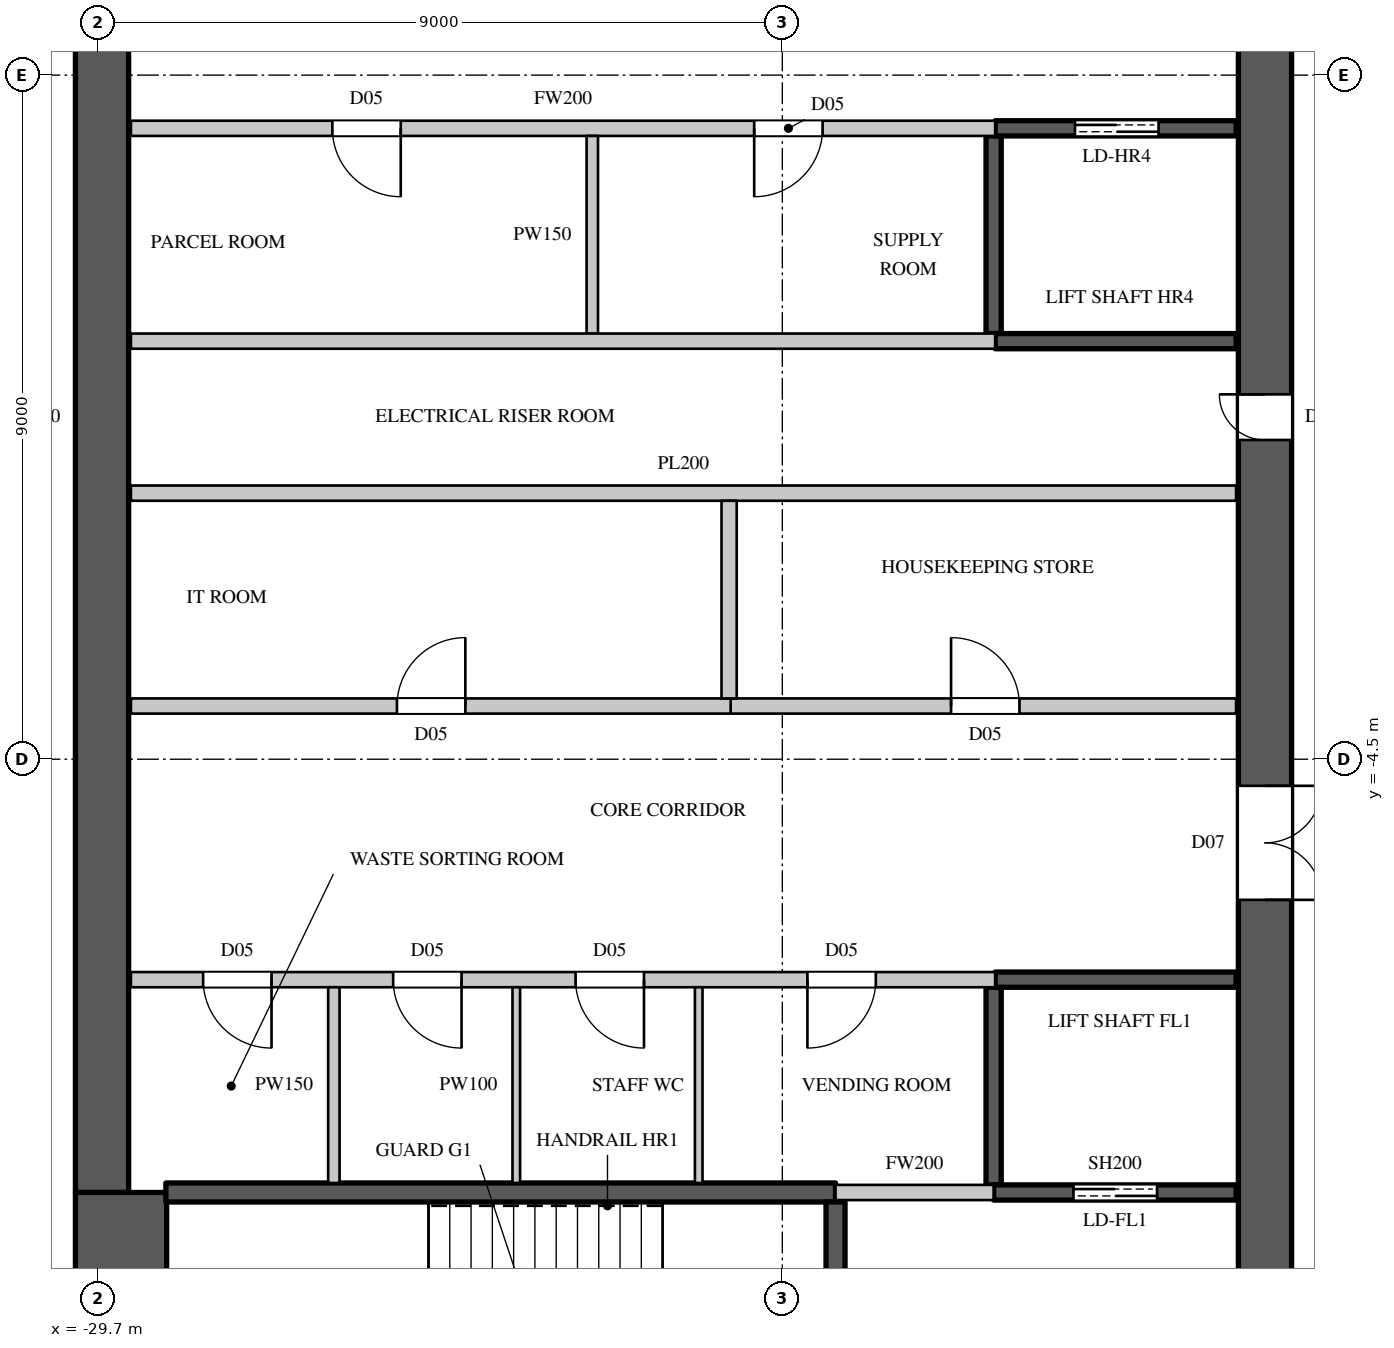
"""IFC4 building model, lengths in metres.
Left out: names, types, materials, properties, quantities, classifications, styles, units other than length and angle.
Written with IfcOpenShell. Run it as: python <this file> out.ifc"""

import sys

from ifc_helpers import new_model, si_unit, direction, frame, frame_2d, origin, place, context, subcontext, project, spatial, rectangle, extrude, element, fill, save


model = new_model("IFC4")
c1 = context("Model", 3, precision=1e-05, world=origin(), true_north=direction((0.0, 1.0)))
c2 = subcontext(c1, "Body", "Model", "MODEL_VIEW")
j1 = project(units=[si_unit("LENGTHUNIT", "METRE"), si_unit("PLANEANGLEUNIT", "RADIAN")], contexts=[c1])
p1 = place(None, origin())
s1 = spatial("IfcSite", under=j1, at=p1, CompositionType="ELEMENT")
p2 = place(p1, origin())
s2 = spatial("IfcBuilding", under=s1, at=p2, CompositionType="ELEMENT")
p3 = place(p2, frame((0.0, 0.0, 251.6)))
s3 = spatial("IfcBuildingStorey", under=s2, at=p3, CompositionType="ELEMENT", Elevation=251.6)
p4 = place(p3, frame((-14.35, -14.8, 0.0), z_axis=(0.0, 0.0, 1.0), x_axis=(0.0, 1.0, 0.0)))
e1 = element("IfcWall", 1, at=p4, inside=s3, PredefinedType="SHEAR", context=c2, shape_type="SweptSolid", body=[
    extrude(rectangle(XDim=29.6, YDim=0.7, at=frame_2d((14.8, 0.0))), origin(), (0.0, 0.0, 1.0), 4.1),
])
p5 = place(p4, frame((1.55, 0.0, 0.0)))
e2 = element("IfcOpeningElement", 2, at=p5, cuts=e1, PredefinedType="OPENING", context=c2, shape_type="SweptSolid", body=[
    extrude(rectangle(XDim=1.5, YDim=2.4, at=frame_2d((0.75, 1.2))), frame((0.0, 0.36, 0.0), z_axis=(0.0, -1.0, 0.0), x_axis=(1.0, 0.0, 0.0)), (0.0, 0.0, 1.0), 0.72),
])
p6 = place(p4, frame((26.55, 0.0, 0.0)))
e3 = element("IfcOpeningElement", 3, at=p6, cuts=e1, PredefinedType="OPENING", context=c2, shape_type="SweptSolid", body=[
    extrude(rectangle(XDim=1.5, YDim=2.4, at=frame_2d((0.75, 1.2))), frame((0.0, 0.36, 0.0), z_axis=(0.0, -1.0, 0.0), x_axis=(1.0, 0.0, 0.0)), (0.0, 0.0, 1.0), 0.72),
])
p7 = place(p4, frame((8.45, 0.0, 0.0)))
e4 = element("IfcOpeningElement", 4, at=p7, cuts=e1, PredefinedType="OPENING", context=c2, shape_type="SweptSolid", body=[
    extrude(rectangle(XDim=1.5, YDim=2.4, at=frame_2d((0.75, 1.2))), frame((0.0, 0.36, 0.0), z_axis=(0.0, -1.0, 0.0), x_axis=(1.0, 0.0, 0.0)), (0.0, 0.0, 1.0), 0.72),
])
p8 = place(p4, frame((19.65, 0.0, 0.0)))
e5 = element("IfcOpeningElement", 5, at=p8, cuts=e1, PredefinedType="OPENING", context=c2, shape_type="SweptSolid", body=[
    extrude(rectangle(XDim=1.5, YDim=2.4, at=frame_2d((0.75, 1.2))), frame((0.0, 0.36, 0.0), z_axis=(0.0, -1.0, 0.0), x_axis=(1.0, 0.0, 0.0)), (0.0, 0.0, 1.0), 0.72),
])
p9 = place(p4, frame((14.5, 0.0, 0.0)))
e6 = element("IfcOpeningElement", 6, at=p9, cuts=e1, PredefinedType="OPENING", context=c2, shape_type="SweptSolid", body=[
    extrude(rectangle(XDim=0.6, YDim=2.0, at=frame_2d((0.3, 1.0))), frame((0.0, 0.36, 0.0), z_axis=(0.0, -1.0, 0.0), x_axis=(1.0, 0.0, 0.0)), (0.0, 0.0, 1.0), 0.72),
])
p10 = place(p3, frame((-29.65, -10.2, 0.0), z_axis=(0.0, 0.0, 1.0), x_axis=(0.0, 1.0, 0.0)))
e7 = element("IfcWall", 7, at=p10, inside=s3, PredefinedType="SHEAR", context=c2, shape_type="SweptSolid", body=[
    extrude(rectangle(XDim=20.4, YDim=0.7, at=frame_2d((10.2, 0.0))), origin(), (0.0, 0.0, 1.0), 4.1),
])
p11 = place(p3, frame((-29.4, -14.8, 0.0), z_axis=(0.0, 0.0, 1.0), x_axis=(0.0, 1.0, 0.0)))
e8 = element("IfcWall", 8, at=p11, inside=s3, PredefinedType="SHEAR", context=c2, shape_type="SweptSolid", body=[
    extrude(rectangle(XDim=4.6, YDim=1.2, at=frame_2d((2.3, 0.0))), origin(), (0.0, 0.0, 1.0), 4.1),
])
p12 = place(p3, frame((-29.27, -7.4, 0.0), z_axis=(0.0, 0.0, 1.0), x_axis=(1.0, 0.0, 0.0)))
e9 = element("IfcWall", 9, at=p12, inside=s3, PredefinedType="PARTITIONING", context=c2, shape_type="SweptSolid", body=[
    extrude(rectangle(XDim=11.37, YDim=0.2, at=frame_2d((5.685, 0.0))), origin(), (0.0, 0.0, 1.0), 3.8),
])
p13 = place(p12, frame((0.95, 0.0, 0.0)))
e10 = element("IfcOpeningElement", 10, at=p13, cuts=e9, PredefinedType="OPENING", context=c2, shape_type="SweptSolid", body=[
    extrude(rectangle(XDim=0.9, YDim=2.2, at=frame_2d((0.45, 1.1))), frame((0.0, 0.11, 0.0), z_axis=(0.0, -1.0, 0.0), x_axis=(1.0, 0.0, 0.0)), (0.0, 0.0, 1.0), 0.22),
])
p14 = place(p12, frame((3.45, 0.0, 0.0)))
e11 = element("IfcOpeningElement", 11, at=p14, cuts=e9, PredefinedType="OPENING", context=c2, shape_type="SweptSolid", body=[
    extrude(rectangle(XDim=0.9, YDim=2.2, at=frame_2d((0.45, 1.1))), frame((0.0, 0.11, 0.0), z_axis=(0.0, -1.0, 0.0), x_axis=(1.0, 0.0, 0.0)), (0.0, 0.0, 1.0), 0.22),
])
p15 = place(p12, frame((5.85, 0.0, 0.0)))
e12 = element("IfcOpeningElement", 12, at=p15, cuts=e9, PredefinedType="OPENING", context=c2, shape_type="SweptSolid", body=[
    extrude(rectangle(XDim=0.9, YDim=2.2, at=frame_2d((0.45, 1.1))), frame((0.0, 0.11, 0.0), z_axis=(0.0, -1.0, 0.0), x_axis=(1.0, 0.0, 0.0)), (0.0, 0.0, 1.0), 0.22),
])
p16 = place(p12, frame((8.9, 0.0, 0.0)))
e13 = element("IfcOpeningElement", 13, at=p16, cuts=e9, PredefinedType="OPENING", context=c2, shape_type="SweptSolid", body=[
    extrude(rectangle(XDim=0.9, YDim=2.2, at=frame_2d((0.45, 1.1))), frame((0.0, 0.11, 0.0), z_axis=(0.0, -1.0, 0.0), x_axis=(1.0, 0.0, 0.0)), (0.0, 0.0, 1.0), 0.22),
])
p17 = place(p3, frame((-29.27, 3.8, 0.0), z_axis=(0.0, 0.0, 1.0), x_axis=(1.0, 0.0, 0.0)))
e14 = element("IfcWall", 14, at=p17, inside=s3, PredefinedType="PARTITIONING", context=c2, shape_type="SweptSolid", body=[
    extrude(rectangle(XDim=11.37, YDim=0.2, at=frame_2d((5.685, 0.0))), origin(), (0.0, 0.0, 1.0), 3.8),
])
p18 = place(p17, frame((2.65, 0.0, 0.0)))
e15 = element("IfcOpeningElement", 15, at=p18, cuts=e14, PredefinedType="OPENING", context=c2, shape_type="SweptSolid", body=[
    extrude(rectangle(XDim=0.9, YDim=2.2, at=frame_2d((0.45, 1.1))), frame((0.0, 0.11, 0.0), z_axis=(0.0, -1.0, 0.0), x_axis=(1.0, 0.0, 0.0)), (0.0, 0.0, 1.0), 0.22),
])
p19 = place(p17, frame((8.2, 0.0, 0.0)))
e16 = element("IfcOpeningElement", 16, at=p19, cuts=e14, PredefinedType="OPENING", context=c2, shape_type="SweptSolid", body=[
    extrude(rectangle(XDim=0.9, YDim=2.2, at=frame_2d((0.45, 1.1))), frame((0.0, 0.11, 0.0), z_axis=(0.0, -1.0, 0.0), x_axis=(1.0, 0.0, 0.0)), (0.0, 0.0, 1.0), 0.22),
])
p20 = place(p3, frame((-21.38, -3.8, 0.0), z_axis=(0.0, 0.0, 1.0), x_axis=(1.0, 0.0, 0.0)))
e17 = element("IfcWall", 17, at=p20, inside=s3, PredefinedType="PARTITIONING", context=c2, shape_type="SweptSolid", body=[
    extrude(rectangle(XDim=6.65, YDim=0.2, at=frame_2d((3.325, 0.0))), origin(), (0.0, 0.0, 1.0), 3.8),
])
p21 = place(p20, frame((2.9, 0.0, 0.0)))
e18 = element("IfcOpeningElement", 18, at=p21, cuts=e17, PredefinedType="OPENING", context=c2, shape_type="SweptSolid", body=[
    extrude(rectangle(XDim=0.9, YDim=2.2, at=frame_2d((0.45, 1.1))), frame((0.0, 0.11, 0.0), z_axis=(0.0, -1.0, 0.0), x_axis=(1.0, 0.0, 0.0)), (0.0, 0.0, 1.0), 0.22),
])
p22 = place(p3, frame((-20.0, -10.2, 0.0), z_axis=(0.0, 0.0, 1.0), x_axis=(1.0, 0.0, 0.0)))
e19 = element("IfcWall", 19, at=p22, inside=s3, PredefinedType="PARTITIONING", context=c2, shape_type="SweptSolid", body=[
    extrude(rectangle(XDim=2.08, YDim=0.2, at=frame_2d((1.04, 0.0))), origin(), (0.0, 0.0, 1.0), 3.8),
])
p23 = place(p3, frame((-26.6, -10.075, 0.0), z_axis=(0.0, 0.0, 1.0), x_axis=(0.0, 1.0, 0.0)))
e20 = element("IfcWall", 20, at=p23, inside=s3, PredefinedType="PARTITIONING", context=c2, shape_type="SweptSolid", body=[
    extrude(rectangle(XDim=2.575, YDim=0.15, at=frame_2d((1.288, 0.0))), origin(), (0.0, 0.0, 1.0), 3.8),
])
p24 = place(p3, frame((-23.2, 1.1, 0.0), z_axis=(0.0, 0.0, 1.0), x_axis=(0.0, 1.0, 0.0)))
e21 = element("IfcWall", 21, at=p24, inside=s3, PredefinedType="PARTITIONING", context=c2, shape_type="SweptSolid", body=[
    extrude(rectangle(XDim=2.6, YDim=0.15, at=frame_2d((1.3, 0.0))), origin(), (0.0, 0.0, 1.0), 3.8),
])
p25 = place(p3, frame((-29.27, -3.8, 0.0), z_axis=(0.0, 0.0, 1.0), x_axis=(1.0, 0.0, 0.0)))
e22 = element("IfcWall", 22, at=p25, inside=s3, PredefinedType="PARTITIONING", context=c2, shape_type="SweptSolid", body=[
    extrude(rectangle(XDim=7.89, YDim=0.2, at=frame_2d((3.945, 0.0))), origin(), (0.0, 0.0, 1.0), 3.8),
])
p26 = place(p25, frame((3.5, 0.0, 0.0)))
e23 = element("IfcOpeningElement", 23, at=p26, cuts=e22, PredefinedType="OPENING", context=c2, shape_type="SweptSolid", body=[
    extrude(rectangle(XDim=0.9, YDim=2.2, at=frame_2d((0.45, 1.1))), frame((0.0, 0.11, 0.0), z_axis=(0.0, -1.0, 0.0), x_axis=(1.0, 0.0, 0.0)), (0.0, 0.0, 1.0), 0.22),
])
p27 = place(p3, frame((-29.27, -1.0, 0.0), z_axis=(0.0, 0.0, 1.0), x_axis=(1.0, 0.0, 0.0)))
e24 = element("IfcWall", 24, at=p27, inside=s3, PredefinedType="PARTITIONING", context=c2, shape_type="SweptSolid", body=[
    extrude(rectangle(XDim=14.54, YDim=0.2, at=frame_2d((7.27, 0.0))), origin(), (0.0, 0.0, 1.0), 3.8),
])
p28 = place(p3, frame((-29.27, 1.0, 0.0), z_axis=(0.0, 0.0, 1.0), x_axis=(1.0, 0.0, 0.0)))
e25 = element("IfcWall", 25, at=p28, inside=s3, PredefinedType="PARTITIONING", context=c2, shape_type="SweptSolid", body=[
    extrude(rectangle(XDim=11.37, YDim=0.2, at=frame_2d((5.685, 0.0))), origin(), (0.0, 0.0, 1.0), 3.8),
])
p29 = place(p3, frame((-21.4, -3.7, 0.0), z_axis=(0.0, 0.0, 1.0), x_axis=(0.0, 1.0, 0.0)))
e26 = element("IfcWall", 26, at=p29, inside=s3, PredefinedType="PARTITIONING", context=c2, shape_type="SweptSolid", body=[
    extrude(rectangle(XDim=2.6, YDim=0.2, at=frame_2d((1.3, 0.0))), origin(), (0.0, 0.0, 1.0), 3.8),
])
p30 = place(p3, frame((-17.92, -10.1, 0.0), z_axis=(0.0, 0.0, 1.0), x_axis=(0.0, 1.0, 0.0)))
e27 = element("IfcWall", 27, at=p30, inside=s3, PredefinedType="SHEAR", context=c2, shape_type="SweptSolid", body=[
    extrude(rectangle(XDim=2.6, YDim=0.2, at=frame_2d((1.3, 0.0))), origin(), (0.0, 0.0, 1.0), 3.8),
])
p31 = place(p3, frame((-17.92, -10.2, 0.0), z_axis=(0.0, 0.0, 1.0), x_axis=(1.0, 0.0, 0.0)))
e28 = element("IfcWall", 28, at=p31, inside=s3, PredefinedType="SHEAR", context=c2, shape_type="SweptSolid", body=[
    extrude(rectangle(XDim=3.19, YDim=0.2, at=frame_2d((1.595, 0.0))), origin(), (0.0, 0.0, 1.0), 3.8),
])
p32 = place(p31, frame((1.05, 0.0, 0.0)))
e29 = element("IfcOpeningElement", 29, at=p32, cuts=e28, PredefinedType="OPENING", context=c2, shape_type="SweptSolid", body=[
    extrude(rectangle(XDim=1.1, YDim=2.2, at=frame_2d((0.55, 1.1))), frame((0.0, 0.11, 0.0), z_axis=(0.0, -1.0, 0.0), x_axis=(1.0, 0.0, 0.0)), (0.0, 0.0, 1.0), 0.22),
])
p33 = place(p3, frame((-17.9, -7.4, 0.0), z_axis=(0.0, 0.0, 1.0), x_axis=(1.0, 0.0, 0.0)))
e30 = element("IfcWall", 30, at=p33, inside=s3, PredefinedType="SHEAR", context=c2, shape_type="SweptSolid", body=[
    extrude(rectangle(XDim=3.17, YDim=0.2, at=frame_2d((1.585, 0.0))), origin(), (0.0, 0.0, 1.0), 3.8),
])
p34 = place(p3, frame((-17.92, 1.1, 0.0), z_axis=(0.0, 0.0, 1.0), x_axis=(0.0, 1.0, 0.0)))
e31 = element("IfcWall", 31, at=p34, inside=s3, PredefinedType="SHEAR", context=c2, shape_type="SweptSolid", body=[
    extrude(rectangle(XDim=2.6, YDim=0.2, at=frame_2d((1.3, 0.0))), origin(), (0.0, 0.0, 1.0), 3.8),
])
p35 = place(p3, frame((-17.9, 1.0, 0.0), z_axis=(0.0, 0.0, 1.0), x_axis=(1.0, 0.0, 0.0)))
e32 = element("IfcWall", 32, at=p35, inside=s3, PredefinedType="SHEAR", context=c2, shape_type="SweptSolid", body=[
    extrude(rectangle(XDim=3.17, YDim=0.2, at=frame_2d((1.585, 0.0))), origin(), (0.0, 0.0, 1.0), 3.8),
])
p36 = place(p3, frame((-17.9, 3.8, 0.0), z_axis=(0.0, 0.0, 1.0), x_axis=(1.0, 0.0, 0.0)))
e33 = element("IfcWall", 33, at=p36, inside=s3, PredefinedType="SHEAR", context=c2, shape_type="SweptSolid", body=[
    extrude(rectangle(XDim=3.17, YDim=0.2, at=frame_2d((1.585, 0.0))), origin(), (0.0, 0.0, 1.0), 3.8),
])
p37 = place(p36, frame((1.05, 0.0, 0.0)))
e34 = element("IfcOpeningElement", 34, at=p37, cuts=e33, PredefinedType="OPENING", context=c2, shape_type="SweptSolid", body=[
    extrude(rectangle(XDim=1.1, YDim=2.2, at=frame_2d((0.55, 1.1))), frame((0.0, 0.11, 0.0), z_axis=(0.0, -1.0, 0.0), x_axis=(1.0, 0.0, 0.0)), (0.0, 0.0, 1.0), 0.22),
])
p38 = place(p3, frame((-28.81, -10.2, 0.0), z_axis=(0.0, 0.0, 1.0), x_axis=(1.0, 0.0, 0.0)))
e35 = element("IfcWall", 35, at=p38, inside=s3, PredefinedType="SHEAR", context=c2, shape_type="SweptSolid", body=[
    extrude(rectangle(XDim=8.81, YDim=0.25, at=frame_2d((4.405, 0.0))), origin(), (0.0, 0.0, 1.0), 3.8),
])
p39 = place(p3, frame((-20.0, -14.77, 0.0), z_axis=(0.0, 0.0, 1.0), x_axis=(0.0, 1.0, 0.0)))
e36 = element("IfcWall", 36, at=p39, inside=s3, PredefinedType="SHEAR", context=c2, shape_type="SweptSolid", body=[
    extrude(rectangle(XDim=4.445, YDim=0.25, at=frame_2d((2.223, 0.0))), origin(), (0.0, 0.0, 1.0), 3.8),
])
p40 = place(p39, frame((1.7, 0.0, 0.0)))
e37 = element("IfcOpeningElement", 37, at=p40, cuts=e36, PredefinedType="OPENING", context=c2, shape_type="SweptSolid", body=[
    extrude(rectangle(XDim=1.1, YDim=2.2, at=frame_2d((0.55, 1.1))), frame((0.0, 0.135, 0.0), z_axis=(0.0, -1.0, 0.0), x_axis=(1.0, 0.0, 0.0)), (0.0, 0.0, 1.0), 0.27),
])
for number, where, z_axis, x_axis in (
    (38, (-24.2, -10.075, 0.0), (0.0, 0.0, 1.0), (0.0, 1.0, 0.0)),
    (39, (-21.8, -10.075, 0.0), (0.0, 0.0, 1.0), (0.0, 1.0, 0.0)),
):
    element("IfcWall", number, at=place(p3, frame(where, z_axis=z_axis, x_axis=x_axis)), inside=s3, PredefinedType="PARTITIONING", context=c2, shape_type="SweptSolid", body=[
        extrude(rectangle(XDim=2.575, YDim=0.1, at=frame_2d((1.288, 0.0))), origin(), (0.0, 0.0, 1.0), 3.8),
    ])
p41 = place(p13, origin())
e40 = element("IfcDoor", 40, at=p41, inside=s3, OperationType="SINGLE_SWING_LEFT", PredefinedType="DOOR", context=c2, shape_type="SweptSolid", body=[
    extrude(rectangle(XDim=0.9, YDim=2.2, at=frame_2d((0.45, 1.1))), frame((0.0, 0.025, 0.0), z_axis=(0.0, -1.0, 0.0), x_axis=(1.0, 0.0, 0.0)), (0.0, 0.0, 1.0), 0.05),
])
fill(e10, e40)
p42 = place(p14, origin())
e41 = element("IfcDoor", 41, at=p42, inside=s3, OperationType="SINGLE_SWING_LEFT", PredefinedType="DOOR", context=c2, shape_type="SweptSolid", body=[
    extrude(rectangle(XDim=0.9, YDim=2.2, at=frame_2d((0.45, 1.1))), frame((0.0, 0.025, 0.0), z_axis=(0.0, -1.0, 0.0), x_axis=(1.0, 0.0, 0.0)), (0.0, 0.0, 1.0), 0.05),
])
fill(e11, e41)
p43 = place(p15, origin())
e42 = element("IfcDoor", 42, at=p43, inside=s3, OperationType="SINGLE_SWING_LEFT", PredefinedType="DOOR", context=c2, shape_type="SweptSolid", body=[
    extrude(rectangle(XDim=0.9, YDim=2.2, at=frame_2d((0.45, 1.1))), frame((0.0, 0.025, 0.0), z_axis=(0.0, -1.0, 0.0), x_axis=(1.0, 0.0, 0.0)), (0.0, 0.0, 1.0), 0.05),
])
fill(e12, e42)
p44 = place(p16, origin())
e43 = element("IfcDoor", 43, at=p44, inside=s3, OperationType="SINGLE_SWING_RIGHT", PredefinedType="DOOR", context=c2, shape_type="SweptSolid", body=[
    extrude(rectangle(XDim=0.9, YDim=2.2, at=frame_2d((0.45, 1.1))), frame((0.0, 0.025, 0.0), z_axis=(0.0, -1.0, 0.0), x_axis=(1.0, 0.0, 0.0)), (0.0, 0.0, 1.0), 0.05),
])
fill(e13, e43)
p45 = place(p26, origin())
e44 = element("IfcDoor", 44, at=p45, inside=s3, OperationType="SINGLE_SWING_RIGHT", PredefinedType="DOOR", context=c2, shape_type="SweptSolid", body=[
    extrude(rectangle(XDim=0.9, YDim=2.2, at=frame_2d((0.45, 1.1))), frame((0.0, 0.025, 0.0), z_axis=(0.0, -1.0, 0.0), x_axis=(1.0, 0.0, 0.0)), (0.0, 0.0, 1.0), 0.05),
])
fill(e23, e44)
p46 = place(p21, origin())
e45 = element("IfcDoor", 45, at=p46, inside=s3, OperationType="SINGLE_SWING_LEFT", PredefinedType="DOOR", context=c2, shape_type="SweptSolid", body=[
    extrude(rectangle(XDim=0.9, YDim=2.2, at=frame_2d((0.45, 1.1))), frame((0.0, 0.025, 0.0), z_axis=(0.0, -1.0, 0.0), x_axis=(1.0, 0.0, 0.0)), (0.0, 0.0, 1.0), 0.05),
])
fill(e18, e45)
p47 = place(p18, origin())
e46 = element("IfcDoor", 46, at=p47, inside=s3, OperationType="SINGLE_SWING_LEFT", PredefinedType="DOOR", context=c2, shape_type="SweptSolid", body=[
    extrude(rectangle(XDim=0.9, YDim=2.2, at=frame_2d((0.45, 1.1))), frame((0.0, 0.025, 0.0), z_axis=(0.0, -1.0, 0.0), x_axis=(1.0, 0.0, 0.0)), (0.0, 0.0, 1.0), 0.05),
])
fill(e15, e46)
p48 = place(p19, origin())
e47 = element("IfcDoor", 47, at=p48, inside=s3, OperationType="SINGLE_SWING_RIGHT", PredefinedType="DOOR", context=c2, shape_type="SweptSolid", body=[
    extrude(rectangle(XDim=0.9, YDim=2.2, at=frame_2d((0.45, 1.1))), frame((0.0, 0.025, 0.0), z_axis=(0.0, -1.0, 0.0), x_axis=(1.0, 0.0, 0.0)), (0.0, 0.0, 1.0), 0.05),
])
fill(e16, e47)
p49 = place(p32, origin())
e48 = element("IfcDoor", 48, at=p49, inside=s3, OperationType="DOUBLE_DOOR_SLIDING", PredefinedType="DOOR", context=c2, shape_type="SweptSolid", body=[
    extrude(rectangle(XDim=1.1, YDim=2.2, at=frame_2d((0.55, 1.1))), frame((0.0, 0.025, 0.0), z_axis=(0.0, -1.0, 0.0), x_axis=(1.0, 0.0, 0.0)), (0.0, 0.0, 1.0), 0.05),
])
fill(e29, e48)
p50 = place(p37, origin())
e49 = element("IfcDoor", 49, at=p50, inside=s3, OperationType="DOUBLE_DOOR_SLIDING", PredefinedType="DOOR", context=c2, shape_type="SweptSolid", body=[
    extrude(rectangle(XDim=1.1, YDim=2.2, at=frame_2d((0.55, 1.1))), frame((0.0, 0.025, 0.0), z_axis=(0.0, -1.0, 0.0), x_axis=(1.0, 0.0, 0.0)), (0.0, 0.0, 1.0), 0.05),
])
fill(e34, e49)
p51 = place(p7, origin())
e50 = element("IfcDoor", 50, at=p51, inside=s3, OperationType="DOUBLE_DOOR_SINGLE_SWING", PredefinedType="DOOR", context=c2, shape_type="SweptSolid", body=[
    extrude(rectangle(XDim=1.5, YDim=2.4, at=frame_2d((0.75, 1.2))), frame((0.0, -0.295, 0.0), z_axis=(0.0, -1.0, 0.0), x_axis=(1.0, 0.0, 0.0)), (0.0, 0.0, 1.0), 0.05),
])
fill(e4, e50)
p52 = place(p9, origin())
e51 = element("IfcDoor", 51, at=p52, inside=s3, OperationType="SINGLE_SWING_RIGHT", PredefinedType="DOOR", context=c2, shape_type="SweptSolid", body=[
    extrude(rectangle(XDim=0.6, YDim=2.0, at=frame_2d((0.3, 1.0))), frame((0.0, 0.345, 0.0), z_axis=(0.0, -1.0, 0.0), x_axis=(1.0, 0.0, 0.0)), (0.0, 0.0, 1.0), 0.05),
])
fill(e6, e51)
save(model, sys.argv[1])
